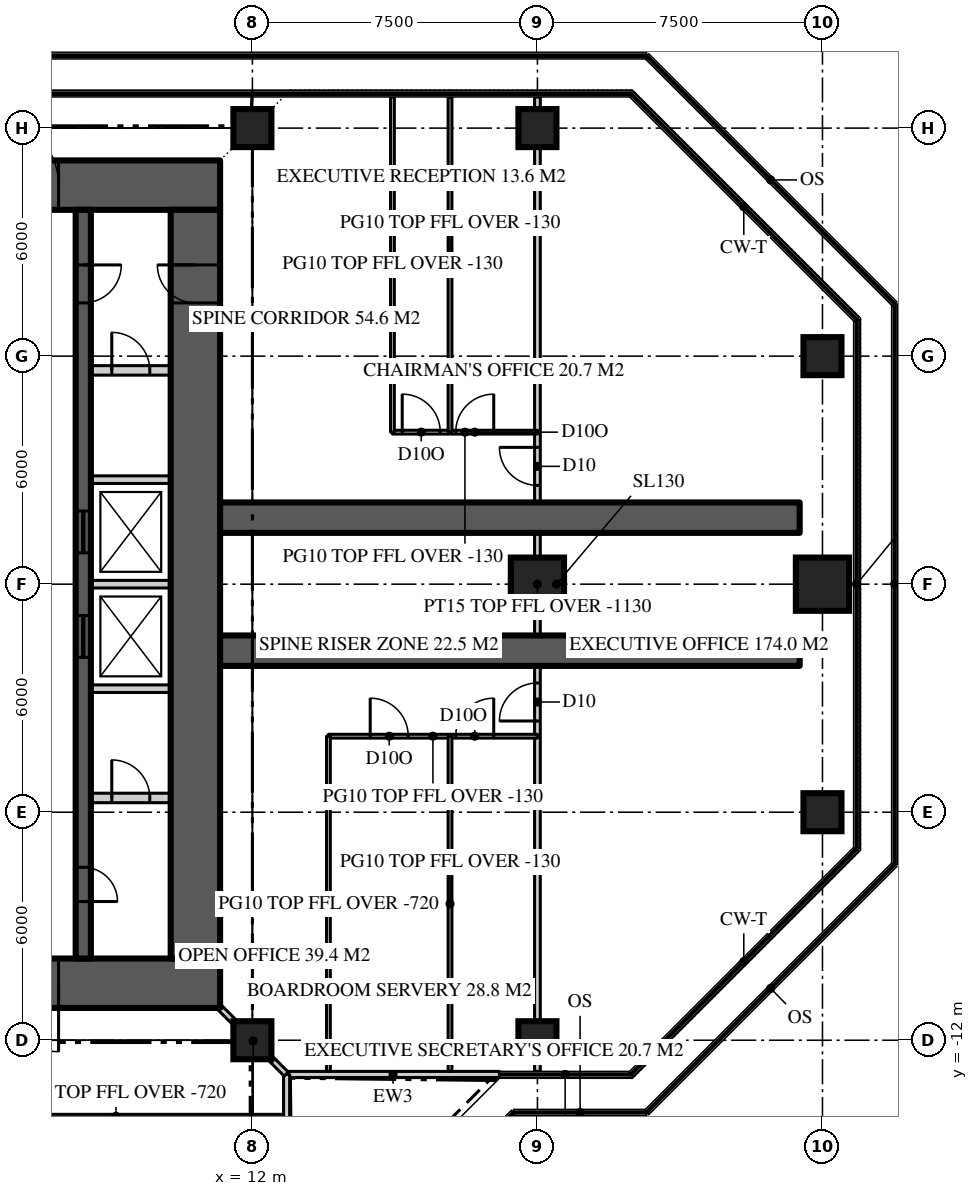
"""IFC4 building model, lengths in metres.
Left out: names, types, materials, properties, quantities, classifications, styles, units other than length and angle.
Written with IfcOpenShell. Run it as: python <this file> out.ifc"""

import sys

from ifc_helpers import new_model, si_unit, direction, frame, frame_2d, origin, origin_2d, place, context, subcontext, project, spatial, rectangle, extrude, element, fill, save


model = new_model("IFC4")
c1 = context("Model", 3, precision=1e-05, world=origin(), true_north=direction((0.0, 1.0)))
c2 = subcontext(c1, "Body", "Model", "MODEL_VIEW")
j1 = project(units=[si_unit("LENGTHUNIT", "METRE"), si_unit("PLANEANGLEUNIT", "RADIAN")], contexts=[c1])
p1 = place(None, origin())
s1 = spatial("IfcSite", under=j1, at=p1, CompositionType="ELEMENT")
p2 = place(p1, origin())
s2 = spatial("IfcBuilding", under=s1, at=p2, CompositionType="ELEMENT")
p3 = place(p2, frame((0.0, 0.0, 294.6)))
s3 = spatial("IfcBuildingStorey", under=s2, at=p3, CompositionType="ELEMENT", Elevation=294.6)
p4 = place(p3, frame((-11.15, 10.5, 0.0), z_axis=(0.0, 0.0, 1.0), x_axis=(1.0, 0.0, 0.0)))
e1 = element("IfcWall", 1, at=p4, inside=s3, PredefinedType="SHEAR", context=c2, shape_type="SweptSolid", body=[
    extrude(rectangle(XDim=22.3, YDim=1.3, at=frame_2d((11.15, 0.0))), origin(), (0.0, 0.0, 1.0), 3.9),
])
p5 = place(p4, frame((4.25, 0.0, 0.0)))
e2 = element("IfcOpeningElement", 2, at=p5, cuts=e1, PredefinedType="OPENING", context=c2, shape_type="SweptSolid", body=[
    extrude(rectangle(XDim=1.8, YDim=2.2, at=frame_2d((0.9, 1.1))), frame((0.0, 0.66, 0.0), z_axis=(0.0, -1.0, 0.0), x_axis=(1.0, 0.0, 0.0)), (0.0, 0.0, 1.0), 1.32),
])
p6 = place(p4, frame((16.25, 0.0, 0.0)))
e3 = element("IfcOpeningElement", 3, at=p6, cuts=e1, PredefinedType="OPENING", context=c2, shape_type="SweptSolid", body=[
    extrude(rectangle(XDim=1.8, YDim=2.2, at=frame_2d((0.9, 1.1))), frame((0.0, 0.66, 0.0), z_axis=(0.0, -1.0, 0.0), x_axis=(1.0, 0.0, 0.0)), (0.0, 0.0, 1.0), 1.32),
])
p7 = place(p3, frame((11.15, -10.5, 0.0), z_axis=(0.0, 0.0, 1.0), x_axis=(-1.0, 0.0, 0.0)))
e4 = element("IfcWall", 4, at=p7, inside=s3, PredefinedType="SHEAR", context=c2, shape_type="SweptSolid", body=[
    extrude(rectangle(XDim=22.3, YDim=1.3, at=frame_2d((11.15, 0.0))), origin(), (0.0, 0.0, 1.0), 3.9),
])
p8 = place(p7, frame((16.25, 0.0, 0.0)))
e5 = element("IfcOpeningElement", 5, at=p8, cuts=e4, PredefinedType="OPENING", context=c2, shape_type="SweptSolid", body=[
    extrude(rectangle(XDim=1.8, YDim=2.2, at=frame_2d((0.9, 1.1))), frame((0.0, 0.66, 0.0), z_axis=(0.0, -1.0, 0.0), x_axis=(1.0, 0.0, 0.0)), (0.0, 0.0, 1.0), 1.32),
])
p9 = place(p7, frame((4.25, 0.0, 0.0)))
e6 = element("IfcOpeningElement", 6, at=p9, cuts=e4, PredefinedType="OPENING", context=c2, shape_type="SweptSolid", body=[
    extrude(rectangle(XDim=1.8, YDim=2.2, at=frame_2d((0.9, 1.1))), frame((0.0, 0.66, 0.0), z_axis=(0.0, -1.0, 0.0), x_axis=(1.0, 0.0, 0.0)), (0.0, 0.0, 1.0), 1.32),
])
p10 = place(p3, frame((10.5, -9.85, 0.0), z_axis=(0.0, 0.0, 1.0), x_axis=(0.0, 1.0, 0.0)))
e7 = element("IfcWall", 7, at=p10, inside=s3, PredefinedType="SHEAR", context=c2, shape_type="SweptSolid", body=[
    extrude(rectangle(XDim=19.7, YDim=1.3, at=frame_2d((9.85, 0.0))), origin(), (0.0, 0.0, 1.0), 3.9),
])
p11 = place(p10, frame((17.25, 0.0, 0.0)))
e8 = element("IfcOpeningElement", 8, at=p11, cuts=e7, PredefinedType="OPENING", context=c2, shape_type="SweptSolid", body=[
    extrude(rectangle(XDim=1.0, YDim=2.2, at=frame_2d((0.5, 1.1))), frame((0.0, 0.66, 0.0), z_axis=(0.0, -1.0, 0.0), x_axis=(1.0, 0.0, 0.0)), (0.0, 0.0, 1.0), 1.32),
])
for number, where, z_axis, x_axis in (
    (9, (11.15, -1.75, 0.0), (0.0, 0.0, 1.0), (1.0, 0.0, 0.0)),
    (10, (11.15, 1.75, 0.0), (0.0, 0.0, 1.0), (1.0, 0.0, 0.0)),
):
    element("IfcWall", number, at=place(p3, frame(where, z_axis=z_axis, x_axis=x_axis)), inside=s3, PredefinedType="SHEAR", context=c2, shape_type="SweptSolid", body=[
        extrude(rectangle(XDim=15.25, YDim=0.8, at=frame_2d((7.625, 0.0))), origin(), (0.0, 0.0, 1.0), 3.9),
    ])
for number, where, z_axis, x_axis in (
    (11, (12.0, -12.0, 0.0), (0.0, 0.0, 1.0), (1.0, 0.0, 0.0)),
    (12, (19.5, -12.0, 0.0), (0.0, 0.0, 1.0), (1.0, 0.0, 0.0)),
    (13, (27.0, -6.0, 0.0), (0.0, 0.0, 1.0), (1.0, 0.0, 0.0)),
):
    element("IfcColumn", number, at=place(p3, frame(where, z_axis=z_axis, x_axis=x_axis)), inside=s3, PredefinedType="COLUMN", context=c2, shape_type="SweptSolid", body=[
        extrude(rectangle(XDim=1.0, YDim=1.0, at=origin_2d()), origin(), (0.0, 0.0, 1.0), 3.9),
    ])
for number, where, z_axis, x_axis in (
    (14, (19.5, 0.0, 0.0), (0.0, 0.0, 1.0), (1.0, 0.0, 0.0)),
    (15, (27.0, 0.0, 0.0), (0.0, 0.0, 1.0), (1.0, 0.0, 0.0)),
):
    element("IfcColumn", number, at=place(p3, frame(where, z_axis=z_axis, x_axis=x_axis)), inside=s3, PredefinedType="COLUMN", context=c2, shape_type="SweptSolid", body=[
        extrude(rectangle(XDim=1.4, YDim=1.4, at=origin_2d()), origin(), (0.0, 0.0, 1.0), 3.9),
    ])
for number, where, z_axis, x_axis in (
    (16, (27.0, 6.0, 0.0), (0.0, 0.0, 1.0), (1.0, 0.0, 0.0)),
    (17, (12.0, 12.0, 0.0), (0.0, 0.0, 1.0), (1.0, 0.0, 0.0)),
    (18, (19.5, 12.0, 0.0), (0.0, 0.0, 1.0), (1.0, 0.0, 0.0)),
):
    element("IfcColumn", number, at=place(p3, frame(where, z_axis=z_axis, x_axis=x_axis)), inside=s3, PredefinedType="COLUMN", context=c2, shape_type="SweptSolid", body=[
        extrude(rectangle(XDim=1.0, YDim=1.0, at=origin_2d()), origin(), (0.0, 0.0, 1.0), 3.9),
    ])
p12 = place(p3, frame((12.9, -12.9, 0.0), z_axis=(0.0, 0.0, 1.0), x_axis=(1.0, 0.0, 0.0)))
e19 = element("IfcWall", 19, at=p12, inside=s3, PredefinedType="SOLIDWALL", context=c2, shape_type="SweptSolid", body=[
    extrude(rectangle(XDim=5.6, YDim=0.16, at=frame_2d((2.8, 0.0))), origin(), (0.0, 0.0, 1.0), 3.77),
])
p13 = place(p3, frame((12.9, -18.5, 0.0), z_axis=(0.0, 0.0, 1.0), x_axis=(0.0, 1.0, 0.0)))
e20 = element("IfcWall", 20, at=p13, inside=s3, PredefinedType="SOLIDWALL", context=c2, shape_type="SweptSolid", body=[
    extrude(rectangle(XDim=5.6, YDim=0.16, at=frame_2d((2.8, 0.0))), origin(), (0.0, 0.0, 1.0), 3.77),
])
p14 = place(p13, frame((2.3, 0.0, 0.0)))
e21 = element("IfcOpeningElement", 21, at=p14, cuts=e20, PredefinedType="OPENING", context=c2, shape_type="SweptSolid", body=[
    extrude(rectangle(XDim=1.0, YDim=2.2, at=frame_2d((0.5, 1.1))), frame((0.0, 0.09, 0.0), z_axis=(0.0, -1.0, 0.0), x_axis=(1.0, 0.0, 0.0)), (0.0, 0.0, 1.0), 0.18),
])
p15 = place(p3, frame((7.55, 9.85, 0.0), z_axis=(0.0, 0.0, 1.0), x_axis=(0.0, -1.0, 0.0)))
e22 = element("IfcWall", 22, at=p15, inside=s3, PredefinedType="SHEAR", context=c2, shape_type="SweptSolid", body=[
    extrude(rectangle(XDim=19.7, YDim=0.4, at=frame_2d((9.85, 0.0))), origin(), (0.0, 0.0, 1.0), 3.9),
])
p16 = place(p15, frame((1.45, 0.0, 0.0)))
e23 = element("IfcOpeningElement", 23, at=p16, cuts=e22, PredefinedType="OPENING", context=c2, shape_type="SweptSolid", body=[
    extrude(rectangle(XDim=1.0, YDim=2.2, at=frame_2d((0.5, 1.1))), frame((0.0, 0.21, 0.0), z_axis=(0.0, -1.0, 0.0), x_axis=(1.0, 0.0, 0.0)), (0.0, 0.0, 1.0), 0.42),
])
p17 = place(p15, frame((17.3, 0.0, 0.0)))
e24 = element("IfcOpeningElement", 24, at=p17, cuts=e22, PredefinedType="OPENING", context=c2, shape_type="SweptSolid", body=[
    extrude(rectangle(XDim=0.9, YDim=2.1, at=frame_2d((0.45, 1.05))), frame((0.0, 0.21, 0.0), z_axis=(0.0, -1.0, 0.0), x_axis=(1.0, 0.0, 0.0)), (0.0, 0.0, 1.0), 0.42),
])
p18 = place(p15, frame((7.925, 0.0, 0.0)))
e25 = element("IfcOpeningElement", 25, at=p18, cuts=e22, PredefinedType="OPENING", context=c2, shape_type="SweptSolid", body=[
    extrude(rectangle(XDim=1.1, YDim=2.2, at=frame_2d((0.55, 1.1))), frame((0.0, 0.21, 0.0), z_axis=(0.0, -1.0, 0.0), x_axis=(1.0, 0.0, 0.0)), (0.0, 0.0, 1.0), 0.42),
])
p19 = place(p15, frame((10.675, 0.0, 0.0)))
e26 = element("IfcOpeningElement", 26, at=p19, cuts=e22, PredefinedType="OPENING", context=c2, shape_type="SweptSolid", body=[
    extrude(rectangle(XDim=1.1, YDim=2.2, at=frame_2d((0.55, 1.1))), frame((0.0, 0.21, 0.0), z_axis=(0.0, -1.0, 0.0), x_axis=(1.0, 0.0, 0.0)), (0.0, 0.0, 1.0), 0.42),
])
p20 = place(p3, frame((7.75, 5.625, 0.0), z_axis=(0.0, 0.0, 1.0), x_axis=(1.0, 0.0, 0.0)))
e27 = element("IfcWall", 27, at=p20, inside=s3, PredefinedType="SOLIDWALL", context=c2, shape_type="SweptSolid", body=[
    extrude(rectangle(XDim=2.1, YDim=0.25, at=frame_2d((1.05, 0.0))), origin(), (0.0, 0.0, 1.0), 3.7),
])
p21 = place(p20, frame((0.55, 0.0, 0.0)))
e28 = element("IfcOpeningElement", 28, at=p21, cuts=e27, PredefinedType="OPENING", context=c2, shape_type="SweptSolid", body=[
    extrude(rectangle(XDim=1.0, YDim=2.2, at=frame_2d((0.5, 1.1))), frame((0.0, 0.135, 0.0), z_axis=(0.0, -1.0, 0.0), x_axis=(1.0, 0.0, 0.0)), (0.0, 0.0, 1.0), 0.27),
])
p22 = place(p3, frame((7.75, -5.625, 0.0), z_axis=(0.0, 0.0, 1.0), x_axis=(1.0, 0.0, 0.0)))
e29 = element("IfcWall", 29, at=p22, inside=s3, PredefinedType="SOLIDWALL", context=c2, shape_type="SweptSolid", body=[
    extrude(rectangle(XDim=2.1, YDim=0.25, at=frame_2d((1.05, 0.0))), origin(), (0.0, 0.0, 1.0), 3.7),
])
p23 = place(p22, frame((0.55, 0.0, 0.0)))
e30 = element("IfcOpeningElement", 30, at=p23, cuts=e29, PredefinedType="OPENING", context=c2, shape_type="SweptSolid", body=[
    extrude(rectangle(XDim=1.0, YDim=2.2, at=frame_2d((0.5, 1.1))), frame((0.0, 0.135, 0.0), z_axis=(0.0, -1.0, 0.0), x_axis=(1.0, 0.0, 0.0)), (0.0, 0.0, 1.0), 0.27),
])
for number, where, z_axis, x_axis in (
    (31, (7.75, -2.75, 0.0), (0.0, 0.0, 1.0), (1.0, 0.0, 0.0)),
    (32, (7.75, 0.0, 0.0), (0.0, 0.0, 1.0), (1.0, 0.0, 0.0)),
    (33, (7.75, 2.75, 0.0), (0.0, 0.0, 1.0), (1.0, 0.0, 0.0)),
):
    element("IfcWall", number, at=place(p3, frame(where, z_axis=z_axis, x_axis=x_axis)), inside=s3, PredefinedType="SOLIDWALL", context=c2, shape_type="SweptSolid", body=[
        extrude(rectangle(XDim=2.1, YDim=0.2, at=frame_2d((1.05, 0.0))), origin(), (0.0, 0.0, 1.0), 3.7),
    ])
p24 = place(p3, frame((19.5, -12.82, 0.0), z_axis=(0.0, 0.0, 1.0), x_axis=(0.0, 1.0, 0.0)))
e34 = element("IfcWall", 34, at=p24, inside=s3, PredefinedType="PARTITIONING", context=c2, shape_type="SweptSolid", body=[
    extrude(rectangle(XDim=25.64, YDim=0.15, at=frame_2d((12.82, 0.0))), origin(), (0.0, 0.0, 1.0), 2.77),
])
p25 = place(p24, frame((15.42, 0.0, 0.0)))
e35 = element("IfcOpeningElement", 35, at=p25, cuts=e34, PredefinedType="OPENING", context=c2, shape_type="SweptSolid", body=[
    extrude(rectangle(XDim=1.0, YDim=2.2, at=frame_2d((0.5, 1.1))), frame((0.0, 0.085, 0.0), z_axis=(0.0, -1.0, 0.0), x_axis=(1.0, 0.0, 0.0)), (0.0, 0.0, 1.0), 0.17),
])
p26 = place(p24, frame((9.22, 0.0, 0.0)))
e36 = element("IfcOpeningElement", 36, at=p26, cuts=e34, PredefinedType="OPENING", context=c2, shape_type="SweptSolid", body=[
    extrude(rectangle(XDim=1.0, YDim=2.2, at=frame_2d((0.5, 1.1))), frame((0.0, 0.085, 0.0), z_axis=(0.0, -1.0, 0.0), x_axis=(1.0, 0.0, 0.0)), (0.0, 0.0, 1.0), 0.17),
])
p27 = place(p3, frame((15.685, 4.0, 0.0), z_axis=(0.0, 0.0, 1.0), x_axis=(1.0, 0.0, 0.0)))
e37 = element("IfcWall", 37, at=p27, inside=s3, PredefinedType="PARTITIONING", context=c2, shape_type="SweptSolid", body=[
    extrude(rectangle(XDim=3.815, YDim=0.1, at=frame_2d((1.907, 0.0))), origin(), (0.0, 0.0, 1.0), 3.77),
])
p28 = place(p27, frame((0.258, 0.0, 0.0)))
e38 = element("IfcOpeningElement", 38, at=p28, cuts=e37, PredefinedType="OPENING", context=c2, shape_type="SweptSolid", body=[
    extrude(rectangle(XDim=1.0, YDim=2.2, at=frame_2d((0.5, 1.1))), frame((0.0, 0.06, 0.0), z_axis=(0.0, -1.0, 0.0), x_axis=(1.0, 0.0, 0.0)), (0.0, 0.0, 1.0), 0.12),
])
p29 = place(p27, frame((1.665, 0.0, 0.0)))
e39 = element("IfcOpeningElement", 39, at=p29, cuts=e37, PredefinedType="OPENING", context=c2, shape_type="SweptSolid", body=[
    extrude(rectangle(XDim=1.0, YDim=2.2, at=frame_2d((0.5, 1.1))), frame((0.0, 0.06, 0.0), z_axis=(0.0, -1.0, 0.0), x_axis=(1.0, 0.0, 0.0)), (0.0, 0.0, 1.0), 0.12),
])
for number, where, z_axis, x_axis in (
    (40, (15.685, 4.0, 0.0), (0.0, 0.0, 1.0), (0.0, 1.0, 0.0)),
    (41, (17.2, 4.0, 0.0), (0.0, 0.0, 1.0), (0.0, 1.0, 0.0)),
):
    element("IfcWall", number, at=place(p3, frame(where, z_axis=z_axis, x_axis=x_axis)), inside=s3, PredefinedType="PARTITIONING", context=c2, shape_type="SweptSolid", body=[
        extrude(rectangle(XDim=8.82, YDim=0.1, at=frame_2d((4.41, 0.0))), origin(), (0.0, 0.0, 1.0), 3.77),
    ])
p30 = place(p3, frame((14.0, -4.0, 0.0), z_axis=(0.0, 0.0, 1.0), x_axis=(1.0, 0.0, 0.0)))
e42 = element("IfcWall", 42, at=p30, inside=s3, PredefinedType="PARTITIONING", context=c2, shape_type="SweptSolid", body=[
    extrude(rectangle(XDim=5.5, YDim=0.1, at=frame_2d((2.75, 0.0))), origin(), (0.0, 0.0, 1.0), 3.77),
])
p31 = place(p30, frame((1.1, 0.0, 0.0)))
e43 = element("IfcOpeningElement", 43, at=p31, cuts=e42, PredefinedType="OPENING", context=c2, shape_type="SweptSolid", body=[
    extrude(rectangle(XDim=1.0, YDim=2.2, at=frame_2d((0.5, 1.1))), frame((0.0, 0.06, 0.0), z_axis=(0.0, -1.0, 0.0), x_axis=(1.0, 0.0, 0.0)), (0.0, 0.0, 1.0), 0.12),
])
p32 = place(p30, frame((3.35, 0.0, 0.0)))
e44 = element("IfcOpeningElement", 44, at=p32, cuts=e42, PredefinedType="OPENING", context=c2, shape_type="SweptSolid", body=[
    extrude(rectangle(XDim=1.0, YDim=2.2, at=frame_2d((0.5, 1.1))), frame((0.0, 0.06, 0.0), z_axis=(0.0, -1.0, 0.0), x_axis=(1.0, 0.0, 0.0)), (0.0, 0.0, 1.0), 0.12),
])
p33 = place(p3, frame((14.0, -4.0, 0.0), z_axis=(0.0, 0.0, 1.0), x_axis=(0.0, -1.0, 0.0)))
e45 = element("IfcWall", 45, at=p33, inside=s3, PredefinedType="PARTITIONING", context=c2, shape_type="SweptSolid", body=[
    extrude(rectangle(XDim=8.82, YDim=0.1, at=frame_2d((4.41, 0.0))), origin(), (0.0, 0.0, 1.0), 3.18),
])
p34 = place(p3, frame((17.2, -4.0, 0.0), z_axis=(0.0, 0.0, 1.0), x_axis=(0.0, -1.0, 0.0)))
e46 = element("IfcWall", 46, at=p34, inside=s3, PredefinedType="PARTITIONING", context=c2, shape_type="SweptSolid", body=[
    extrude(rectangle(XDim=8.82, YDim=0.1, at=frame_2d((4.41, 0.0))), origin(), (0.0, 0.0, 1.0), 3.77),
])
p35 = place(p3, frame((4.0, -14.0, 0.0), z_axis=(0.0, 0.0, 1.0), x_axis=(1.0, 0.0, 0.0)))
e47 = element("IfcWall", 47, at=p35, inside=s3, PredefinedType="PARTITIONING", context=c2, shape_type="SweptSolid", body=[
    extrude(rectangle(XDim=8.82, YDim=0.1, at=frame_2d((4.41, 0.0))), origin(), (0.0, 0.0, 1.0), 3.18),
])
p36 = place(p3, frame((11.15, -11.15, 0.0), z_axis=(0.0, 0.0, 1.0), x_axis=(0.707106781187, -0.707106781187, 0.0)))
e48 = element("IfcWall", 48, at=p36, inside=s3, PredefinedType="PARTITIONING", context=c2, shape_type="SweptSolid", body=[
    extrude(rectangle(XDim=2.461, YDim=0.15, at=frame_2d((1.23, 0.0))), origin(), (0.0, 0.0, 1.0), 3.22),
])
p37 = place(p6, origin())
e49 = element("IfcDoor", 49, at=p37, inside=s3, OperationType="DOUBLE_DOOR_DOUBLE_SWING", PredefinedType="DOOR", context=c2, shape_type="SweptSolid", body=[
    extrude(rectangle(XDim=1.8, YDim=2.2, at=frame_2d((0.9, 1.1))), frame((0.0, 0.025, 0.0), z_axis=(0.0, -1.0, 0.0), x_axis=(1.0, 0.0, 0.0)), (0.0, 0.0, 1.0), 0.05),
])
fill(e3, e49)
p38 = place(p9, origin())
e50 = element("IfcDoor", 50, at=p38, inside=s3, OperationType="DOUBLE_DOOR_DOUBLE_SWING", PredefinedType="DOOR", context=c2, shape_type="SweptSolid", body=[
    extrude(rectangle(XDim=1.8, YDim=2.2, at=frame_2d((0.9, 1.1))), frame((0.0, 0.025, 0.0), z_axis=(0.0, -1.0, 0.0), x_axis=(1.0, 0.0, 0.0)), (0.0, 0.0, 1.0), 0.05),
])
fill(e6, e50)
p39 = place(p16, origin())
e51 = element("IfcDoor", 51, at=p39, inside=s3, OperationType="SINGLE_SWING_LEFT", PredefinedType="DOOR", context=c2, shape_type="SweptSolid", body=[
    extrude(rectangle(XDim=1.0, YDim=2.2, at=frame_2d((0.5, 1.1))), frame((0.0, 0.025, 0.0), z_axis=(0.0, -1.0, 0.0), x_axis=(1.0, 0.0, 0.0)), (0.0, 0.0, 1.0), 0.05),
])
fill(e23, e51)
p40 = place(p11, origin())
e52 = element("IfcDoor", 52, at=p40, inside=s3, OperationType="SINGLE_SWING_RIGHT", PredefinedType="DOOR", context=c2, shape_type="SweptSolid", body=[
    extrude(rectangle(XDim=1.0, YDim=2.2, at=frame_2d((0.5, 1.1))), frame((0.0, 0.025, 0.0), z_axis=(0.0, -1.0, 0.0), x_axis=(1.0, 0.0, 0.0)), (0.0, 0.0, 1.0), 0.05),
])
fill(e8, e52)
p41 = place(p17, origin())
e53 = element("IfcDoor", 53, at=p41, inside=s3, OperationType="SINGLE_SWING_RIGHT", PredefinedType="DOOR", context=c2, shape_type="SweptSolid", body=[
    extrude(rectangle(XDim=0.9, YDim=2.1, at=frame_2d((0.45, 1.05))), frame((0.0, 0.025, 0.0), z_axis=(0.0, -1.0, 0.0), x_axis=(1.0, 0.0, 0.0)), (0.0, 0.0, 1.0), 0.05),
])
fill(e24, e53)
p42 = place(p18, origin())
e54 = element("IfcDoor", 54, at=p42, inside=s3, OperationType="SLIDING_TO_LEFT", PredefinedType="DOOR", context=c2, shape_type="SweptSolid", body=[
    extrude(rectangle(XDim=1.1, YDim=2.2, at=frame_2d((0.55, 1.1))), frame((0.0, 0.025, 0.0), z_axis=(0.0, -1.0, 0.0), x_axis=(1.0, 0.0, 0.0)), (0.0, 0.0, 1.0), 0.05),
])
fill(e25, e54)
p43 = place(p19, origin())
e55 = element("IfcDoor", 55, at=p43, inside=s3, OperationType="SLIDING_TO_LEFT", PredefinedType="DOOR", context=c2, shape_type="SweptSolid", body=[
    extrude(rectangle(XDim=1.1, YDim=2.2, at=frame_2d((0.55, 1.1))), frame((0.0, 0.025, 0.0), z_axis=(0.0, -1.0, 0.0), x_axis=(1.0, 0.0, 0.0)), (0.0, 0.0, 1.0), 0.05),
])
fill(e26, e55)
p44 = place(p25, origin())
e56 = element("IfcDoor", 56, at=p44, inside=s3, OperationType="SINGLE_SWING_RIGHT", PredefinedType="DOOR", context=c2, shape_type="SweptSolid", body=[
    extrude(rectangle(XDim=1.0, YDim=2.2, at=frame_2d((0.5, 1.1))), frame((0.0, 0.025, 0.0), z_axis=(0.0, -1.0, 0.0), x_axis=(1.0, 0.0, 0.0)), (0.0, 0.0, 1.0), 0.05),
])
fill(e35, e56)
p45 = place(p26, origin())
e57 = element("IfcDoor", 57, at=p45, inside=s3, OperationType="SINGLE_SWING_LEFT", PredefinedType="DOOR", context=c2, shape_type="SweptSolid", body=[
    extrude(rectangle(XDim=1.0, YDim=2.2, at=frame_2d((0.5, 1.1))), frame((0.0, 0.025, 0.0), z_axis=(0.0, -1.0, 0.0), x_axis=(1.0, 0.0, 0.0)), (0.0, 0.0, 1.0), 0.05),
])
fill(e36, e57)
p46 = place(p28, origin())
e58 = element("IfcDoor", 58, at=p46, inside=s3, OperationType="SINGLE_SWING_LEFT", PredefinedType="DOOR", context=c2, shape_type="SweptSolid", body=[
    extrude(rectangle(XDim=1.0, YDim=2.2, at=frame_2d((0.5, 1.1))), frame((0.0, 0.025, 0.0), z_axis=(0.0, -1.0, 0.0), x_axis=(1.0, 0.0, 0.0)), (0.0, 0.0, 1.0), 0.05),
])
fill(e38, e58)
p47 = place(p29, origin())
e59 = element("IfcDoor", 59, at=p47, inside=s3, OperationType="SINGLE_SWING_RIGHT", PredefinedType="DOOR", context=c2, shape_type="SweptSolid", body=[
    extrude(rectangle(XDim=1.0, YDim=2.2, at=frame_2d((0.5, 1.1))), frame((0.0, 0.025, 0.0), z_axis=(0.0, -1.0, 0.0), x_axis=(1.0, 0.0, 0.0)), (0.0, 0.0, 1.0), 0.05),
])
fill(e39, e59)
p48 = place(p31, origin())
e60 = element("IfcDoor", 60, at=p48, inside=s3, OperationType="SINGLE_SWING_LEFT", PredefinedType="DOOR", context=c2, shape_type="SweptSolid", body=[
    extrude(rectangle(XDim=1.0, YDim=2.2, at=frame_2d((0.5, 1.1))), frame((0.0, 0.025, 0.0), z_axis=(0.0, -1.0, 0.0), x_axis=(1.0, 0.0, 0.0)), (0.0, 0.0, 1.0), 0.05),
])
fill(e43, e60)
p49 = place(p32, origin())
e61 = element("IfcDoor", 61, at=p49, inside=s3, OperationType="SINGLE_SWING_RIGHT", PredefinedType="DOOR", context=c2, shape_type="SweptSolid", body=[
    extrude(rectangle(XDim=1.0, YDim=2.2, at=frame_2d((0.5, 1.1))), frame((0.0, 0.025, 0.0), z_axis=(0.0, -1.0, 0.0), x_axis=(1.0, 0.0, 0.0)), (0.0, 0.0, 1.0), 0.05),
])
fill(e44, e61)
p50 = place(p21, origin())
e62 = element("IfcDoor", 62, at=p50, inside=s3, OperationType="SINGLE_SWING_LEFT", PredefinedType="DOOR", context=c2, shape_type="SweptSolid", body=[
    extrude(rectangle(XDim=1.0, YDim=2.2, at=frame_2d((0.5, 1.1))), frame((0.0, 0.025, 0.0), z_axis=(0.0, -1.0, 0.0), x_axis=(1.0, 0.0, 0.0)), (0.0, 0.0, 1.0), 0.05),
])
fill(e28, e62)
p51 = place(p23, origin())
e63 = element("IfcDoor", 63, at=p51, inside=s3, OperationType="SINGLE_SWING_LEFT", PredefinedType="DOOR", context=c2, shape_type="SweptSolid", body=[
    extrude(rectangle(XDim=1.0, YDim=2.2, at=frame_2d((0.5, 1.1))), frame((0.0, 0.025, 0.0), z_axis=(0.0, -1.0, 0.0), x_axis=(1.0, 0.0, 0.0)), (0.0, 0.0, 1.0), 0.05),
])
fill(e30, e63)
save(model, sys.argv[1])
